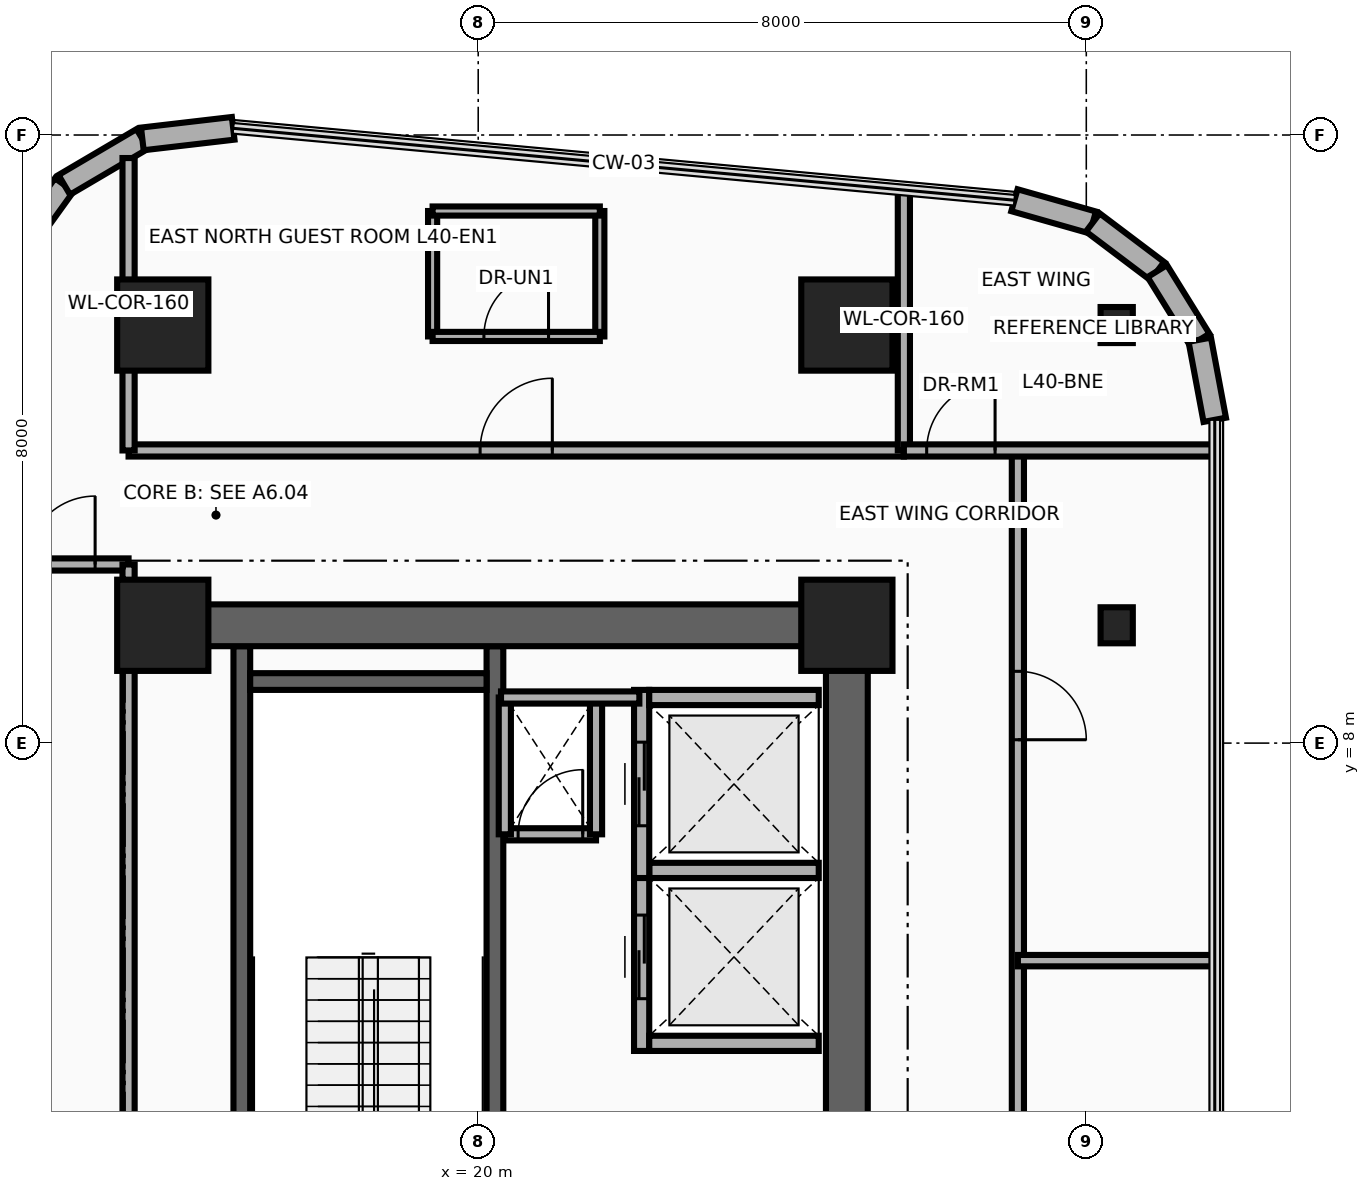
"""IFC4 building model, lengths in metres.
Left out: names, types, materials, properties, quantities, classifications, styles, units other than length and angle.
Written with IfcOpenShell. Run it as: python <this file> out.ifc"""

import sys

from ifc_helpers import new_model, si_unit, direction, frame, frame_2d, origin, origin_2d, place, context, subcontext, project, spatial, rectangle, i_section, extrude, source, transform, mapped, element, fill, save


model = new_model("IFC4")
c1 = context("Model", 3, precision=1e-05, world=origin(), true_north=direction((0.0, 1.0)))
c2 = subcontext(c1, "Body", "Model", "MODEL_VIEW")
j1 = project(units=[si_unit("LENGTHUNIT", "METRE"), si_unit("PLANEANGLEUNIT", "RADIAN")], contexts=[c1])
p1 = place(None, origin())
s1 = spatial("IfcSite", under=j1, at=p1, CompositionType="ELEMENT")
p2 = place(p1, origin())
s2 = spatial("IfcBuilding", under=s1, at=p2, CompositionType="ELEMENT")
p3 = place(p2, frame((0.0, 0.0, 157.5)))
s3 = spatial("IfcBuildingStorey", under=s2, at=p3, CompositionType="ELEMENT", Elevation=157.5)
for number, where, z_axis, x_axis in (
    (1, (16.89, 0.68, 0.0), (0.0, 0.0, 1.0), (0.0, 1.0, 0.0)),
    (2, (20.22, 0.68, 0.0), (0.0, 0.0, 1.0), (0.0, 1.0, 0.0)),
):
    element("IfcWall", number, at=place(p3, frame(where, z_axis=z_axis, x_axis=x_axis)), inside=s3, PredefinedType="SHEAR", context=c2, shape_type="SweptSolid", body=[
        extrude(rectangle(XDim=8.595, YDim=0.22, at=frame_2d((4.297, 0.0))), origin(), (0.0, 0.0, 1.0), 3.46),
    ])
p4 = place(p3, frame((17.0, 8.81, 0.0), z_axis=(0.0, 0.0, 1.0), x_axis=(1.0, 0.0, 0.0)))
e3 = element("IfcWall", 3, at=p4, inside=s3, PredefinedType="SHEAR", context=c2, shape_type="SweptSolid", body=[
    extrude(rectangle(XDim=3.11, YDim=0.22, at=frame_2d((1.555, 0.0))), origin(), (0.0, 0.0, 1.0), 3.46),
])
p5 = place(p3, frame((24.85, 0.95, 0.0), z_axis=(0.0, 0.0, 1.0), x_axis=(0.0, 1.0, 0.0)))
e4 = element("IfcWall", 4, at=p5, inside=s3, PredefinedType="SHEAR", context=c2, shape_type="SweptSolid", body=[
    extrude(rectangle(XDim=8.875, YDim=0.55, at=frame_2d((4.438, 0.0))), origin(), (0.0, 0.0, 1.0), 3.46),
])
p6 = place(p3, frame((15.85, 9.55, 0.0), z_axis=(0.0, 0.0, 1.0), x_axis=(1.0, 0.0, 0.0)))
e5 = element("IfcWall", 5, at=p6, inside=s3, PredefinedType="SHEAR", context=c2, shape_type="SweptSolid", body=[
    extrude(rectangle(XDim=9.0, YDim=0.55, at=frame_2d((4.5, 0.0))), origin(), (0.0, 0.0, 1.0), 3.46),
])
m1 = source(origin(), c2, "Body", "SweptSolid", [
    extrude(rectangle(XDim=1.2, YDim=1.2, at=origin_2d()), origin(), (0.0, 0.0, 1.0), 3.7),
])
for number, where, z_axis, x_axis in (
    (6, (15.85, 9.55, 0.0), (0.0, 0.0, 1.0), (1.0, 0.0, 0.0)),
    (7, (24.85, 9.55, 0.0), (0.0, 0.0, 1.0), (1.0, 0.0, 0.0)),
):
    element("IfcColumn", number, at=place(p3, frame(where, z_axis=z_axis, x_axis=x_axis)), inside=s3, PredefinedType="COLUMN", context=c2, shape_type="MappedRepresentation", body=[
        mapped(m1, transform((0.0, 0.0, 0.0), x_axis=(1.0, 0.0, 0.0), y_axis=(0.0, 1.0, 0.0), z_axis=(0.0, 0.0, 1.0), scale=1.0)),
    ])
m2 = source(origin(), c2, "Body", "SweptSolid", [
    extrude(i_section(OverallWidth=0.424, OverallDepth=0.474, WebThickness=0.048, FlangeThickness=0.077, at=origin_2d()), origin(), (0.0, 0.0, 1.0), 3.7),
])
p7 = place(p3, frame((28.4, 9.55, 0.0), z_axis=(0.0, 0.0, 1.0), x_axis=(1.0, 0.0, 0.0)))
e8 = element("IfcColumn", 8, at=p7, inside=s3, PredefinedType="COLUMN", context=c2, shape_type="MappedRepresentation", body=[
    mapped(m2, transform((0.0, 0.0, 0.0), x_axis=(1.0, 0.0, 0.0), y_axis=(0.0, 1.0, 0.0), z_axis=(0.0, 0.0, 1.0), scale=1.0)),
])
for number, where, z_axis, x_axis in (
    (9, (15.85, 13.5, 0.0), (0.0, 0.0, 1.0), (1.0, 0.0, 0.0)),
    (10, (24.85, 13.5, 0.0), (0.0, 0.0, 1.0), (1.0, 0.0, 0.0)),
):
    element("IfcColumn", number, at=place(p3, frame(where, z_axis=z_axis, x_axis=x_axis)), inside=s3, PredefinedType="COLUMN", context=c2, shape_type="MappedRepresentation", body=[
        mapped(m1, transform((0.0, 0.0, 0.0), x_axis=(1.0, 0.0, 0.0), y_axis=(0.0, 1.0, 0.0), z_axis=(0.0, 0.0, 1.0), scale=1.0)),
    ])
p8 = place(p3, frame((28.4, 13.5, 0.0), z_axis=(0.0, 0.0, 1.0), x_axis=(1.0, 0.0, 0.0)))
e11 = element("IfcColumn", 11, at=p8, inside=s3, PredefinedType="COLUMN", context=c2, shape_type="MappedRepresentation", body=[
    mapped(m2, transform((0.0, 0.0, 0.0), x_axis=(1.0, 0.0, 0.0), y_axis=(0.0, 1.0, 0.0), z_axis=(0.0, 0.0, 1.0), scale=1.0)),
])
for number, where, z_axis, x_axis in (
    (12, (13.858, 14.377, 0.0), (0.0, 0.0, 1.0), (0.584, 0.812, 0.0)),
    (13, (14.554, 15.344, 0.0), (0.0, 0.0, 1.0), (0.862, 0.507, 0.0)),
):
    element("IfcWall", number, at=place(p3, frame(where, z_axis=z_axis, x_axis=x_axis)), inside=s3, PredefinedType="SOLIDWALL", context=c2, shape_type="SweptSolid", body=[
        extrude(rectangle(XDim=1.192, YDim=0.3, at=frame_2d((0.596, 0.0))), origin(), (0.0, 0.0, 1.0), 3.46),
    ])
p9 = place(p3, frame((15.581, 15.949, 0.0), z_axis=(0.0, 0.0, 1.0), x_axis=(0.993288417722, 0.115663819837, 0.0)))
e14 = element("IfcWall", 14, at=p9, inside=s3, PredefinedType="SOLIDWALL", context=c2, shape_type="SweptSolid", body=[
    extrude(rectangle(XDim=1.203, YDim=0.3, at=frame_2d((0.602, 0.0))), origin(), (0.0, 0.0, 1.0), 3.46),
])
p10 = place(p3, frame((27.055, 15.142, 0.0), z_axis=(0.0, 0.0, 1.0), x_axis=(0.962012179147, -0.273006533206, 0.0)))
e15 = element("IfcWall", 15, at=p10, inside=s3, PredefinedType="SOLIDWALL", context=c2, shape_type="SweptSolid", body=[
    extrude(rectangle(XDim=1.072, YDim=0.3, at=frame_2d((0.536, 0.0))), origin(), (0.0, 0.0, 1.0), 3.46),
])
for number, where, z_axis, x_axis in (
    (16, (28.086, 14.849, 0.0), (0.0, 0.0, 1.0), (0.798, -0.602, 0.0)),
    (17, (28.934, 14.21, 0.0), (0.0, 0.0, 1.0), (0.527, -0.85, 0.0)),
):
    element("IfcWall", number, at=place(p3, frame(where, z_axis=z_axis, x_axis=x_axis)), inside=s3, PredefinedType="SOLIDWALL", context=c2, shape_type="SweptSolid", body=[
        extrude(rectangle(XDim=1.062, YDim=0.3, at=frame_2d((0.531, 0.0))), origin(), (0.0, 0.0, 1.0), 3.46),
    ])
p11 = place(p3, frame((29.493, 13.307, 0.0), z_axis=(0.0, 0.0, 1.0), x_axis=(0.183752343116, -0.98297257154, 0.0)))
e18 = element("IfcWall", 18, at=p11, inside=s3, PredefinedType="SOLIDWALL", context=c2, shape_type="SweptSolid", body=[
    extrude(rectangle(XDim=1.072, YDim=0.3, at=frame_2d((0.536, 0.0))), origin(), (0.0, 0.0, 1.0), 3.46),
])
p12 = place(p3, frame((22.15, 3.95, 0.0), z_axis=(0.0, 0.0, 1.0), x_axis=(0.0, 1.0, 0.0)))
e19 = element("IfcWall", 19, at=p12, inside=s3, PredefinedType="MOVABLE", context=c2, shape_type="SweptSolid", body=[
    extrude(rectangle(XDim=2.475, YDim=0.2, at=frame_2d((1.238, 0.0))), origin(), (0.0, 0.0, 1.0), 3.46),
])
p13 = place(p12, frame((0.688, 0.0, 0.0)))
e20 = element("IfcOpeningElement", 20, at=p13, cuts=e19, PredefinedType="OPENING", context=c2, shape_type="SweptSolid", body=[
    extrude(rectangle(XDim=1.1, YDim=2.1, at=frame_2d((0.55, 1.05))), frame((0.0, 0.115, 0.0), z_axis=(0.0, -1.0, 0.0), x_axis=(1.0, 0.0, 0.0)), (0.0, 0.0, 1.0), 0.23),
])
for number, where, z_axis, x_axis in (
    (21, (22.25, 4.05, 0.0), (0.0, 0.0, 1.0), (1.0, 0.0, 0.0)),
    (22, (22.25, 6.325, 0.0), (0.0, 0.0, 1.0), (1.0, 0.0, 0.0)),
):
    element("IfcWall", number, at=place(p3, frame(where, z_axis=z_axis, x_axis=x_axis)), inside=s3, PredefinedType="MOVABLE", context=c2, shape_type="SweptSolid", body=[
        extrude(rectangle(XDim=2.23, YDim=0.2, at=frame_2d((1.115, 0.0))), origin(), (0.0, 0.0, 1.0), 3.46),
    ])
p14 = place(p3, frame((22.15, 6.225, 0.0), z_axis=(0.0, 0.0, 1.0), x_axis=(0.0, 1.0, 0.0)))
e23 = element("IfcWall", 23, at=p14, inside=s3, PredefinedType="MOVABLE", context=c2, shape_type="SweptSolid", body=[
    extrude(rectangle(XDim=2.475, YDim=0.2, at=frame_2d((1.237, 0.0))), origin(), (0.0, 0.0, 1.0), 3.46),
])
p15 = place(p14, frame((0.688, 0.0, 0.0)))
e24 = element("IfcOpeningElement", 24, at=p15, cuts=e23, PredefinedType="OPENING", context=c2, shape_type="SweptSolid", body=[
    extrude(rectangle(XDim=1.1, YDim=2.1, at=frame_2d((0.55, 1.05))), frame((0.0, 0.115, 0.0), z_axis=(0.0, -1.0, 0.0), x_axis=(1.0, 0.0, 0.0)), (0.0, 0.0, 1.0), 0.23),
])
p16 = place(p3, frame((22.25, 8.6, 0.0), z_axis=(0.0, 0.0, 1.0), x_axis=(1.0, 0.0, 0.0)))
e25 = element("IfcWall", 25, at=p16, inside=s3, PredefinedType="MOVABLE", context=c2, shape_type="SweptSolid", body=[
    extrude(rectangle(XDim=2.23, YDim=0.2, at=frame_2d((1.115, 0.0))), origin(), (0.0, 0.0, 1.0), 3.46),
])
p17 = place(p3, frame((20.35, 6.8, 0.0), z_axis=(0.0, 0.0, 1.0), x_axis=(1.0, 0.0, 0.0)))
e26 = element("IfcWall", 26, at=p17, inside=s3, PredefinedType="PARTITIONING", context=c2, shape_type="SweptSolid", body=[
    extrude(rectangle(XDim=1.2, YDim=0.16, at=frame_2d((0.6, 0.0))), origin(), (0.0, 0.0, 1.0), 3.46),
])
p18 = place(p17, frame((0.175, 0.0, 0.0)))
e27 = element("IfcOpeningElement", 27, at=p18, cuts=e26, PredefinedType="OPENING", context=c2, shape_type="SweptSolid", body=[
    extrude(rectangle(XDim=0.85, YDim=2.05, at=frame_2d((0.425, 1.025))), frame((0.0, 0.095, 0.0), z_axis=(0.0, -1.0, 0.0), x_axis=(1.0, 0.0, 0.0)), (0.0, 0.0, 1.0), 0.19),
])
for number, where, z_axis, x_axis in (
    (28, (21.55, 6.8, 0.0), (0.0, 0.0, 1.0), (0.0, 1.0, 0.0)),
    (29, (20.35, 6.8, 0.0), (0.0, 0.0, 1.0), (0.0, 1.0, 0.0)),
):
    element("IfcWall", number, at=place(p3, frame(where, z_axis=z_axis, x_axis=x_axis)), inside=s3, PredefinedType="PARTITIONING", context=c2, shape_type="SweptSolid", body=[
        extrude(rectangle(XDim=1.8, YDim=0.16, at=frame_2d((0.9, 0.0))), origin(), (0.0, 0.0, 1.0), 3.46),
    ])
p19 = place(p3, frame((20.3, 8.6, 0.0), z_axis=(0.0, 0.0, 1.0), x_axis=(1.0, 0.0, 0.0)))
e30 = element("IfcWall", 30, at=p19, inside=s3, PredefinedType="PARTITIONING", context=c2, shape_type="SweptSolid", body=[
    extrude(rectangle(XDim=1.82, YDim=0.16, at=frame_2d((0.91, 0.0))), origin(), (0.0, 0.0, 1.0), 3.46),
])
p20 = place(p3, frame((15.4, 11.85, 0.0), z_axis=(0.0, 0.0, 1.0), x_axis=(1.0, 0.0, 0.0)))
e31 = element("IfcWall", 31, at=p20, inside=s3, PredefinedType="PARTITIONING", context=c2, shape_type="SweptSolid", body=[
    extrude(rectangle(XDim=10.2, YDim=0.16, at=frame_2d((5.1, 0.0))), origin(), (0.0, 0.0, 1.0), 2.834),
])
p21 = place(p20, frame((4.625, 0.0, 0.0)))
e32 = element("IfcOpeningElement", 32, at=p21, cuts=e31, PredefinedType="OPENING", context=c2, shape_type="SweptSolid", body=[
    extrude(rectangle(XDim=0.95, YDim=2.15, at=frame_2d((0.475, 1.075))), frame((0.0, 0.095, 0.0), z_axis=(0.0, -1.0, 0.0), x_axis=(1.0, 0.0, 0.0)), (0.0, 0.0, 1.0), 0.19),
])
p22 = place(p3, frame((15.4, 11.85, 0.0), z_axis=(0.0, 0.0, 1.0), x_axis=(0.0, 1.0, 0.0)))
e33 = element("IfcWall", 33, at=p22, inside=s3, PredefinedType="PARTITIONING", context=c2, shape_type="SweptSolid", body=[
    extrude(rectangle(XDim=3.847, YDim=0.16, at=frame_2d((1.923, 0.0))), origin(), (0.0, 0.0, 1.0), 3.46),
])
p23 = place(p3, frame((25.6, 11.85, 0.0), z_axis=(0.0, 0.0, 1.0), x_axis=(0.0, 1.0, 0.0)))
e34 = element("IfcWall", 34, at=p23, inside=s3, PredefinedType="PARTITIONING", context=c2, shape_type="SweptSolid", body=[
    extrude(rectangle(XDim=3.426, YDim=0.16, at=frame_2d((1.713, 0.0))), origin(), (0.0, 0.0, 1.0), 2.666),
])
for number, where, z_axis, x_axis in (
    (35, (19.4, 13.35, 0.0), (0.0, 0.0, 1.0), (0.0, 1.0, 0.0)),
    (36, (21.6, 13.35, 0.0), (0.0, 0.0, 1.0), (0.0, 1.0, 0.0)),
):
    element("IfcWall", number, at=place(p3, frame(where, z_axis=z_axis, x_axis=x_axis)), inside=s3, PredefinedType="PARTITIONING", context=c2, shape_type="SweptSolid", body=[
        extrude(rectangle(XDim=1.65, YDim=0.12, at=frame_2d((0.825, 0.0))), origin(), (0.0, 0.0, 1.0), 2.666),
    ])
p24 = place(p3, frame((19.4, 15.0, 0.0), z_axis=(0.0, 0.0, 1.0), x_axis=(1.0, 0.0, 0.0)))
e37 = element("IfcWall", 37, at=p24, inside=s3, PredefinedType="PARTITIONING", context=c2, shape_type="SweptSolid", body=[
    extrude(rectangle(XDim=2.2, YDim=0.12, at=frame_2d((1.1, 0.0))), origin(), (0.0, 0.0, 1.0), 3.46),
])
p25 = place(p3, frame((19.4, 13.35, 0.0), z_axis=(0.0, 0.0, 1.0), x_axis=(1.0, 0.0, 0.0)))
e38 = element("IfcWall", 38, at=p25, inside=s3, PredefinedType="PARTITIONING", context=c2, shape_type="SweptSolid", body=[
    extrude(rectangle(XDim=2.2, YDim=0.12, at=frame_2d((1.1, 0.0))), origin(), (0.0, 0.0, 1.0), 2.666),
])
p26 = place(p25, frame((0.675, 0.0, 0.0)))
e39 = element("IfcOpeningElement", 39, at=p26, cuts=e38, PredefinedType="OPENING", context=c2, shape_type="SweptSolid", body=[
    extrude(rectangle(XDim=0.85, YDim=2.1, at=frame_2d((0.425, 1.05))), frame((0.0, 0.075, 0.0), z_axis=(0.0, -1.0, 0.0), x_axis=(1.0, 0.0, 0.0)), (0.0, 0.0, 1.0), 0.15),
])
p27 = place(p3, frame((27.1, -11.701, 0.0), z_axis=(0.0, 0.0, 1.0), x_axis=(0.0, 1.0, 0.0)))
e40 = element("IfcWall", 40, at=p27, inside=s3, PredefinedType="PARTITIONING", context=c2, shape_type="SweptSolid", body=[
    extrude(rectangle(XDim=23.551, YDim=0.16, at=frame_2d((11.775, 0.0))), origin(), (0.0, 0.0, 1.0), 2.666),
])
p28 = place(p27, frame((0.8, 0.0, 0.0)))
e41 = element("IfcOpeningElement", 41, at=p28, cuts=e40, PredefinedType="OPENING", context=c2, shape_type="SweptSolid", body=[
    extrude(rectangle(XDim=0.9, YDim=2.1, at=frame_2d((0.45, 1.05))), frame((0.0, 0.095, 0.0), z_axis=(0.0, -1.0, 0.0), x_axis=(1.0, 0.0, 0.0)), (0.0, 0.0, 1.0), 0.19),
])
p29 = place(p27, frame((6.32, 0.0, 0.0)))
e42 = element("IfcOpeningElement", 42, at=p29, cuts=e40, PredefinedType="OPENING", context=c2, shape_type="SweptSolid", body=[
    extrude(rectangle(XDim=0.9, YDim=2.1, at=frame_2d((0.45, 1.05))), frame((0.0, 0.095, 0.0), z_axis=(0.0, -1.0, 0.0), x_axis=(1.0, 0.0, 0.0)), (0.0, 0.0, 1.0), 0.19),
])
p30 = place(p27, frame((13.032, 0.0, 0.0)))
e43 = element("IfcOpeningElement", 43, at=p30, cuts=e40, PredefinedType="OPENING", context=c2, shape_type="SweptSolid", body=[
    extrude(rectangle(XDim=0.9, YDim=2.1, at=frame_2d((0.45, 1.05))), frame((0.0, 0.095, 0.0), z_axis=(0.0, -1.0, 0.0), x_axis=(1.0, 0.0, 0.0)), (0.0, 0.0, 1.0), 0.19),
])
p31 = place(p27, frame((19.745, 0.0, 0.0)))
e44 = element("IfcOpeningElement", 44, at=p31, cuts=e40, PredefinedType="OPENING", context=c2, shape_type="SweptSolid", body=[
    extrude(rectangle(XDim=0.9, YDim=2.1, at=frame_2d((0.45, 1.05))), frame((0.0, 0.095, 0.0), z_axis=(0.0, -1.0, 0.0), x_axis=(1.0, 0.0, 0.0)), (0.0, 0.0, 1.0), 0.19),
])
p32 = place(p3, frame((25.6, 11.85, 0.0), z_axis=(0.0, 0.0, 1.0), x_axis=(1.0, 0.0, 0.0)))
e45 = element("IfcWall", 45, at=p32, inside=s3, PredefinedType="PARTITIONING", context=c2, shape_type="SweptSolid", body=[
    extrude(rectangle(XDim=4.09, YDim=0.16, at=frame_2d((2.045, 0.0))), origin(), (0.0, 0.0, 1.0), 2.896),
])
p33 = place(p32, frame((0.3, 0.0, 0.0)))
e46 = element("IfcOpeningElement", 46, at=p33, cuts=e45, PredefinedType="OPENING", context=c2, shape_type="SweptSolid", body=[
    extrude(rectangle(XDim=0.9, YDim=2.1, at=frame_2d((0.45, 1.05))), frame((0.0, 0.095, 0.0), z_axis=(0.0, -1.0, 0.0), x_axis=(1.0, 0.0, 0.0)), (0.0, 0.0, 1.0), 0.19),
])
p34 = place(p3, frame((27.1, 5.138, 0.0), z_axis=(0.0, 0.0, 1.0), x_axis=(1.0, 0.0, 0.0)))
e47 = element("IfcWall", 47, at=p34, inside=s3, PredefinedType="PARTITIONING", context=c2, shape_type="SweptSolid", body=[
    extrude(rectangle(XDim=2.59, YDim=0.15, at=frame_2d((1.295, 0.0))), origin(), (0.0, 0.0, 1.0), 2.896),
])
p35 = place(p3, frame((13.61, 10.35, 0.0), z_axis=(0.0, 0.0, 1.0), x_axis=(1.0, 0.0, 0.0)))
e48 = element("IfcWall", 48, at=p35, inside=s3, PredefinedType="PARTITIONING", context=c2, shape_type="SweptSolid", body=[
    extrude(rectangle(XDim=1.79, YDim=0.16, at=frame_2d((0.895, 0.0))), origin(), (0.0, 0.0, 1.0), 3.46),
])
p36 = place(p35, frame((0.45, 0.0, 0.0)))
e49 = element("IfcOpeningElement", 49, at=p36, cuts=e48, PredefinedType="OPENING", context=c2, shape_type="SweptSolid", body=[
    extrude(rectangle(XDim=0.9, YDim=2.1, at=frame_2d((0.45, 1.05))), frame((0.0, 0.095, 0.0), z_axis=(0.0, -1.0, 0.0), x_axis=(1.0, 0.0, 0.0)), (0.0, 0.0, 1.0), 0.19),
])
p37 = place(p3, frame((15.4, 1.0, 0.0), z_axis=(0.0, 0.0, 1.0), x_axis=(0.0, 1.0, 0.0)))
e50 = element("IfcWall", 50, at=p37, inside=s3, PredefinedType="PARTITIONING", context=c2, shape_type="SweptSolid", body=[
    extrude(rectangle(XDim=9.35, YDim=0.16, at=frame_2d((4.675, 0.0))), origin(), (0.0, 0.0, 1.0), 3.46),
])
p38 = place(p13, origin())
e51 = element("IfcDoor", 51, at=p38, inside=s3, OperationType="DOUBLE_DOOR_SLIDING", PredefinedType="DOOR", context=c2, shape_type="SweptSolid", body=[
    extrude(rectangle(XDim=1.1, YDim=2.1, at=frame_2d((0.55, 1.05))), frame((0.0, 0.025, 0.0), z_axis=(0.0, -1.0, 0.0), x_axis=(1.0, 0.0, 0.0)), (0.0, 0.0, 1.0), 0.05),
])
fill(e20, e51)
p39 = place(p15, origin())
e52 = element("IfcDoor", 52, at=p39, inside=s3, OperationType="DOUBLE_DOOR_SLIDING", PredefinedType="DOOR", context=c2, shape_type="SweptSolid", body=[
    extrude(rectangle(XDim=1.1, YDim=2.1, at=frame_2d((0.55, 1.05))), frame((0.0, 0.025, 0.0), z_axis=(0.0, -1.0, 0.0), x_axis=(1.0, 0.0, 0.0)), (0.0, 0.0, 1.0), 0.05),
])
fill(e24, e52)
p40 = place(p18, origin())
e53 = element("IfcDoor", 53, at=p40, inside=s3, OperationType="SINGLE_SWING_RIGHT", PredefinedType="DOOR", context=c2, shape_type="SweptSolid", body=[
    extrude(rectangle(XDim=0.85, YDim=2.05, at=frame_2d((0.425, 1.025))), frame((0.0, 0.025, 0.0), z_axis=(0.0, -1.0, 0.0), x_axis=(1.0, 0.0, 0.0)), (0.0, 0.0, 1.0), 0.05),
])
fill(e27, e53)
p41 = place(p21, origin())
e54 = element("IfcDoor", 54, at=p41, inside=s3, OperationType="SINGLE_SWING_RIGHT", PredefinedType="DOOR", context=c2, shape_type="SweptSolid", body=[
    extrude(rectangle(XDim=0.95, YDim=2.15, at=frame_2d((0.475, 1.075))), frame((0.0, 0.025, 0.0), z_axis=(0.0, -1.0, 0.0), x_axis=(1.0, 0.0, 0.0)), (0.0, 0.0, 1.0), 0.05),
])
fill(e32, e54)
p42 = place(p26, origin())
e55 = element("IfcDoor", 55, at=p42, inside=s3, OperationType="SINGLE_SWING_LEFT", PredefinedType="DOOR", context=c2, shape_type="SweptSolid", body=[
    extrude(rectangle(XDim=0.85, YDim=2.1, at=frame_2d((0.425, 1.05))), frame((0.0, 0.025, 0.0), z_axis=(0.0, -1.0, 0.0), x_axis=(1.0, 0.0, 0.0)), (0.0, 0.0, 1.0), 0.05),
])
fill(e39, e55)
p43 = place(p33, origin())
e56 = element("IfcDoor", 56, at=p43, inside=s3, OperationType="SINGLE_SWING_LEFT", PredefinedType="DOOR", context=c2, shape_type="SweptSolid", body=[
    extrude(rectangle(XDim=0.9, YDim=2.1, at=frame_2d((0.45, 1.05))), frame((0.0, 0.025, 0.0), z_axis=(0.0, -1.0, 0.0), x_axis=(1.0, 0.0, 0.0)), (0.0, 0.0, 1.0), 0.05),
])
fill(e46, e56)
p44 = place(p31, frame((0.9, 0.0, 0.0), z_axis=(0.0, 0.0, 1.0), x_axis=(-1.0, 0.0, 0.0)))
e57 = element("IfcDoor", 57, at=p44, inside=s3, OperationType="SINGLE_SWING_LEFT", PredefinedType="DOOR", context=c2, shape_type="SweptSolid", body=[
    extrude(rectangle(XDim=0.9, YDim=2.1, at=frame_2d((0.45, 1.05))), frame((0.0, 0.025, 0.0), z_axis=(0.0, -1.0, 0.0), x_axis=(1.0, 0.0, 0.0)), (0.0, 0.0, 1.0), 0.05),
])
fill(e44, e57)
p45 = place(p36, origin())
e58 = element("IfcDoor", 58, at=p45, inside=s3, OperationType="SINGLE_SWING_RIGHT", PredefinedType="DOOR", context=c2, shape_type="SweptSolid", body=[
    extrude(rectangle(XDim=0.9, YDim=2.1, at=frame_2d((0.45, 1.05))), frame((0.0, 0.025, 0.0), z_axis=(0.0, -1.0, 0.0), x_axis=(1.0, 0.0, 0.0)), (0.0, 0.0, 1.0), 0.05),
])
fill(e49, e58)
save(model, sys.argv[1])
